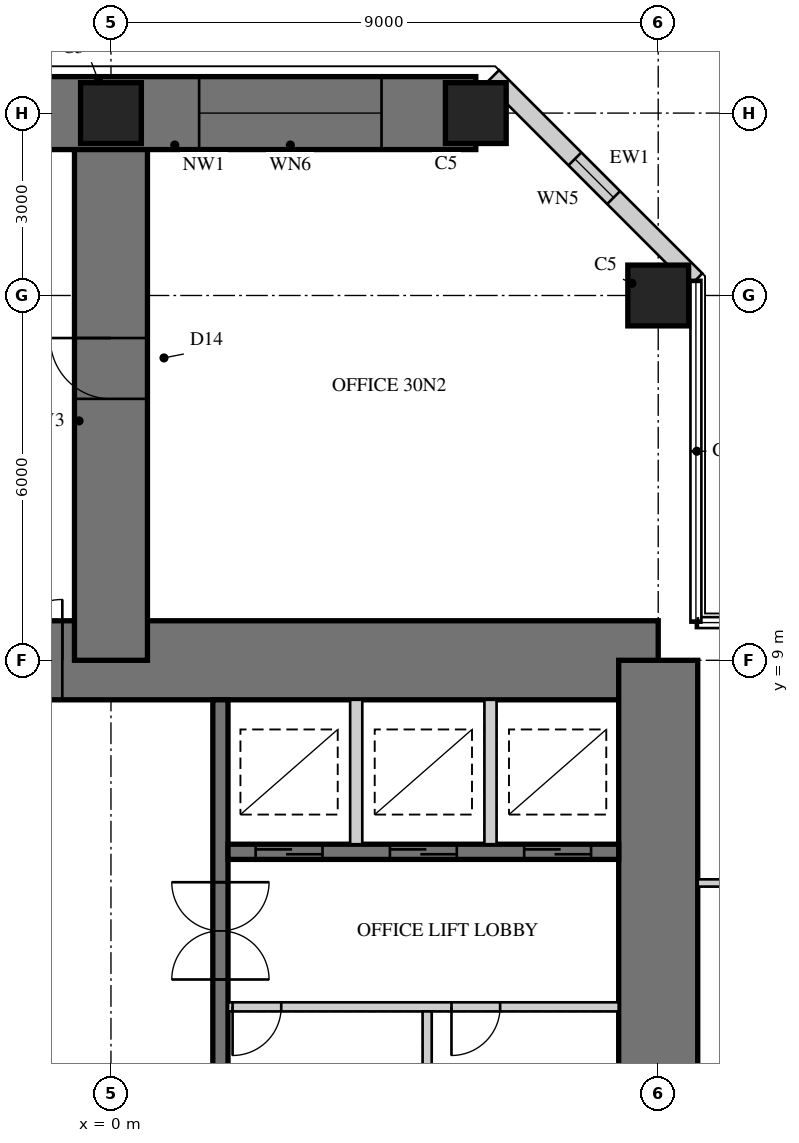
"""IFC4 building model, lengths in metres.
Left out: names, types, materials, properties, quantities, classifications, styles, units other than length and angle.
Written with IfcOpenShell. Run it as: python <this file> out.ifc"""

import sys

from ifc_helpers import new_model, si_unit, direction, frame, frame_2d, origin, origin_2d, place, context, subcontext, project, spatial, rectangle, hollow_rectangle, extrude, element, fill, save


model = new_model("IFC4")
c1 = context("Model", 3, precision=1e-05, world=origin(), true_north=direction((0.0, 1.0)))
c2 = subcontext(c1, "Body", "Model", "MODEL_VIEW")
j1 = project(units=[si_unit("LENGTHUNIT", "METRE"), si_unit("PLANEANGLEUNIT", "RADIAN")], contexts=[c1])
p1 = place(None, origin())
s1 = spatial("IfcSite", under=j1, at=p1, CompositionType="ELEMENT")
p2 = place(p1, origin())
s2 = spatial("IfcBuilding", under=s1, at=p2, CompositionType="ELEMENT")
p3 = place(p2, frame((0.0, 0.0, 124.5)))
s3 = spatial("IfcBuildingStorey", under=s2, at=p3, CompositionType="ELEMENT", Elevation=124.5)
p4 = place(p3, frame((9.0, 9.0, 0.0), z_axis=(0.0, 0.0, 1.0), x_axis=(-1.0, 0.0, 0.0)))
e1 = element("IfcWall", 1, at=p4, inside=s3, PredefinedType="SHEAR", context=c2, shape_type="SweptSolid", body=[
    extrude(rectangle(XDim=18.0, YDim=1.3, at=frame_2d((9.0, 0.0))), origin(), (0.0, 0.0, 1.0), 4.0),
])
p5 = place(p4, frame((9.8, 0.0, 0.0)))
e2 = element("IfcOpeningElement", 2, at=p5, cuts=e1, PredefinedType="OPENING", context=c2, shape_type="SweptSolid", body=[
    extrude(rectangle(XDim=1.0, YDim=2.4, at=frame_2d((0.5, 1.2))), frame((0.0, 0.66, 0.0), z_axis=(0.0, -1.0, 0.0), x_axis=(1.0, 0.0, 0.0)), (0.0, 0.0, 1.0), 1.32),
])
p6 = place(p3, frame((9.0, -9.0, 0.0), z_axis=(0.0, 0.0, 1.0), x_axis=(0.0, 1.0, 0.0)))
e3 = element("IfcWall", 3, at=p6, inside=s3, PredefinedType="SHEAR", context=c2, shape_type="SweptSolid", body=[
    extrude(rectangle(XDim=18.0, YDim=1.3, at=frame_2d((9.0, 0.0))), origin(), (0.0, 0.0, 1.0), 4.0),
])
p7 = place(p6, frame((9.8, 0.0, 0.0)))
e4 = element("IfcOpeningElement", 4, at=p7, cuts=e3, PredefinedType="OPENING", context=c2, shape_type="SweptSolid", body=[
    extrude(rectangle(XDim=1.0, YDim=2.4, at=frame_2d((0.5, 1.2))), frame((0.0, 0.66, 0.0), z_axis=(0.0, -1.0, 0.0), x_axis=(1.0, 0.0, 0.0)), (0.0, 0.0, 1.0), 1.32),
])
p8 = place(p3, frame((1.8, 1.875, 0.0), z_axis=(0.0, 0.0, 1.0), x_axis=(0.0, 1.0, 0.0)))
e5 = element("IfcWall", 5, at=p8, inside=s3, PredefinedType="SHEAR", context=c2, shape_type="SweptSolid", body=[
    extrude(rectangle(XDim=6.475, YDim=0.25, at=frame_2d((3.238, 0.0))), origin(), (0.0, 0.0, 1.0), 4.0),
])
p9 = place(p8, frame((1.875, 0.0, 0.0)))
e6 = element("IfcOpeningElement", 6, at=p9, cuts=e5, PredefinedType="OPENING", context=c2, shape_type="SweptSolid", body=[
    extrude(rectangle(XDim=1.6, YDim=2.4, at=frame_2d((0.8, 1.2))), frame((0.0, 0.135, 0.0), z_axis=(0.0, -1.0, 0.0), x_axis=(1.0, 0.0, 0.0)), (0.0, 0.0, 1.0), 0.27),
])
p10 = place(p3, frame((1.925, 5.85, 0.0), z_axis=(0.0, 0.0, 1.0), x_axis=(1.0, 0.0, 0.0)))
e7 = element("IfcWall", 7, at=p10, inside=s3, PredefinedType="SHEAR", context=c2, shape_type="SweptSolid", body=[
    extrude(rectangle(XDim=6.425, YDim=0.25, at=frame_2d((3.212, 0.0))), origin(), (0.0, 0.0, 1.0), 4.0),
])
p11 = place(p10, frame((0.454, 0.0, 0.0)))
e8 = element("IfcOpeningElement", 8, at=p11, cuts=e7, PredefinedType="OPENING", context=c2, shape_type="SweptSolid", body=[
    extrude(rectangle(XDim=1.1, YDim=2.2, at=frame_2d((0.55, 1.1))), frame((0.0, 0.135, 0.0), z_axis=(0.0, -1.0, 0.0), x_axis=(1.0, 0.0, 0.0)), (0.0, 0.0, 1.0), 0.27),
])
p12 = place(p10, frame((2.663, 0.0, 0.0)))
e9 = element("IfcOpeningElement", 9, at=p12, cuts=e7, PredefinedType="OPENING", context=c2, shape_type="SweptSolid", body=[
    extrude(rectangle(XDim=1.1, YDim=2.2, at=frame_2d((0.55, 1.1))), frame((0.0, 0.135, 0.0), z_axis=(0.0, -1.0, 0.0), x_axis=(1.0, 0.0, 0.0)), (0.0, 0.0, 1.0), 0.27),
])
p13 = place(p10, frame((4.871, 0.0, 0.0)))
e10 = element("IfcOpeningElement", 10, at=p13, cuts=e7, PredefinedType="OPENING", context=c2, shape_type="SweptSolid", body=[
    extrude(rectangle(XDim=1.1, YDim=2.2, at=frame_2d((0.55, 1.1))), frame((0.0, 0.135, 0.0), z_axis=(0.0, -1.0, 0.0), x_axis=(1.0, 0.0, 0.0)), (0.0, 0.0, 1.0), 0.27),
])
p14 = place(p3, frame((1.925, 3.3, 0.0), z_axis=(0.0, 0.0, 1.0), x_axis=(1.0, 0.0, 0.0)))
e11 = element("IfcWall", 11, at=p14, inside=s3, PredefinedType="PARTITIONING", context=c2, shape_type="SweptSolid", body=[
    extrude(rectangle(XDim=6.425, YDim=0.15, at=frame_2d((3.212, 0.0))), origin(), (0.0, 0.0, 1.0), 4.0),
])
p15 = place(p14, frame((0.075, 0.0, 0.0)))
e12 = element("IfcOpeningElement", 12, at=p15, cuts=e11, PredefinedType="OPENING", context=c2, shape_type="SweptSolid", body=[
    extrude(rectangle(XDim=0.8, YDim=2.1, at=frame_2d((0.4, 1.05))), frame((0.0, 0.085, 0.0), z_axis=(0.0, -1.0, 0.0), x_axis=(1.0, 0.0, 0.0)), (0.0, 0.0, 1.0), 0.17),
])
p16 = place(p14, frame((3.675, 0.0, 0.0)))
e13 = element("IfcOpeningElement", 13, at=p16, cuts=e11, PredefinedType="OPENING", context=c2, shape_type="SweptSolid", body=[
    extrude(rectangle(XDim=0.8, YDim=2.1, at=frame_2d((0.4, 1.05))), frame((0.0, 0.085, 0.0), z_axis=(0.0, -1.0, 0.0), x_axis=(1.0, 0.0, 0.0)), (0.0, 0.0, 1.0), 0.17),
])
p17 = place(p3, frame((5.2, 2.125, 0.0), z_axis=(0.0, 0.0, 1.0), x_axis=(0.0, 1.0, 0.0)))
e14 = element("IfcWall", 14, at=p17, inside=s3, PredefinedType="PARTITIONING", context=c2, shape_type="SweptSolid", body=[
    extrude(rectangle(XDim=1.1, YDim=0.15, at=frame_2d((0.55, 0.0))), origin(), (0.0, 0.0, 1.0), 4.0),
])
for number, where, z_axis, x_axis in (
    (15, (4.033, 5.975, 0.0), (0.0, 0.0, 1.0), (0.0, 1.0, 0.0)),
    (16, (6.242, 5.975, 0.0), (0.0, 0.0, 1.0), (0.0, 1.0, 0.0)),
):
    element("IfcWall", number, at=place(p3, frame(where, z_axis=z_axis, x_axis=x_axis)), inside=s3, PredefinedType="PARTITIONING", context=c2, shape_type="SweptSolid", body=[
        extrude(rectangle(XDim=2.375, YDim=0.2, at=frame_2d((1.188, 0.0))), origin(), (0.0, 0.0, 1.0), 4.0),
    ])
p18 = place(p3, frame((0.0, 9.0, 0.0), z_axis=(0.0, 0.0, 1.0), x_axis=(0.0, 1.0, 0.0)))
e17 = element("IfcWall", 17, at=p18, inside=s3, PredefinedType="SHEAR", context=c2, shape_type="SweptSolid", body=[
    extrude(rectangle(XDim=9.0, YDim=1.2, at=frame_2d((4.5, 0.0))), origin(), (0.0, 0.0, 1.0), 4.0),
])
p19 = place(p18, frame((4.3, 0.0, 0.0)))
e18 = element("IfcOpeningElement", 18, at=p19, cuts=e17, PredefinedType="OPENING", context=c2, shape_type="SweptSolid", body=[
    extrude(rectangle(XDim=1.0, YDim=2.2, at=frame_2d((0.5, 1.1))), frame((0.0, 0.61, 0.0), z_axis=(0.0, -1.0, 0.0), x_axis=(1.0, 0.0, 0.0)), (0.0, 0.0, 1.0), 1.22),
])
p20 = place(p3, frame((6.0, 18.0, 0.0), z_axis=(0.0, 0.0, 1.0), x_axis=(-1.0, 0.0, 0.0)))
e19 = element("IfcWall", 19, at=p20, inside=s3, PredefinedType="SHEAR", context=c2, shape_type="SweptSolid", body=[
    extrude(rectangle(XDim=12.0, YDim=1.2, at=frame_2d((6.0, 0.0))), origin(), (0.0, 0.0, 1.0), 4.0),
])
p21 = place(p20, frame((1.55, 0.0, 0.6)))
e20 = element("IfcOpeningElement", 20, at=p21, cuts=e19, PredefinedType="OPENING", context=c2, shape_type="SweptSolid", body=[
    extrude(rectangle(XDim=3.0, YDim=2.4, at=frame_2d((1.5, 1.2))), frame((0.0, 0.61, 0.0), z_axis=(0.0, -1.0, 0.0), x_axis=(1.0, 0.0, 0.0)), (0.0, 0.0, 1.0), 1.22),
])
p22 = place(p20, frame((7.45, 0.0, 0.6)))
e21 = element("IfcOpeningElement", 21, at=p22, cuts=e19, PredefinedType="OPENING", context=c2, shape_type="SweptSolid", body=[
    extrude(rectangle(XDim=3.0, YDim=2.4, at=frame_2d((1.5, 1.2))), frame((0.0, 0.61, 0.0), z_axis=(0.0, -1.0, 0.0), x_axis=(1.0, 0.0, 0.0)), (0.0, 0.0, 1.0), 1.22),
])
for number, where, z_axis, x_axis in (
    (22, (9.0, 15.0, 0.0), (0.0, 0.0, 1.0), (1.0, 0.0, 0.0)),
    (23, (6.0, 18.0, 0.0), (0.0, 0.0, 1.0), (1.0, 0.0, 0.0)),
    (24, (0.0, 18.0, 0.0), (0.0, 0.0, 1.0), (1.0, 0.0, 0.0)),
):
    element("IfcColumn", number, at=place(p3, frame(where, z_axis=z_axis, x_axis=x_axis)), inside=s3, PredefinedType="COLUMN", context=c2, shape_type="SweptSolid", body=[
        extrude(rectangle(XDim=1.0, YDim=1.0, at=origin_2d()), origin(), (0.0, 0.0, 1.0), 4.0),
    ])
p23 = place(p3, frame((9.62, 15.257, 0.0), z_axis=(0.0, 0.0, 1.0), x_axis=(-0.707106781187, 0.707106781187, 0.0)))
e25 = element("IfcWall", 25, at=p23, inside=s3, PredefinedType="SOLIDWALL", context=c2, shape_type="SweptSolid", body=[
    extrude(rectangle(XDim=4.728, YDim=0.3, at=frame_2d((2.364, 0.0))), origin(), (0.0, 0.0, 1.0), 3.8),
])
p24 = place(p23, frame((1.914, 0.0, 0.3)))
e26 = element("IfcOpeningElement", 26, at=p24, cuts=e25, PredefinedType="OPENING", context=c2, shape_type="SweptSolid", body=[
    extrude(rectangle(XDim=0.9, YDim=2.4, at=frame_2d((0.45, 1.2))), frame((0.0, 0.16, 0.0), z_axis=(0.0, -1.0, 0.0), x_axis=(1.0, 0.0, 0.0)), (0.0, 0.0, 1.0), 0.32),
])
p25 = place(p3, frame((9.65, 5.337, 0.0), z_axis=(0.0, 0.0, 1.0), x_axis=(1.0, 0.0, 0.0)))
e27 = element("IfcWall", 27, at=p25, inside=s3, PredefinedType="PLUMBINGWALL", context=c2, shape_type="SweptSolid", body=[
    extrude(rectangle(XDim=5.25, YDim=0.12, at=frame_2d((2.625, 0.0))), origin(), (0.0, 0.0, 1.0), 3.8),
])
p26 = place(p24, origin())
e28 = element("IfcWindow", 28, at=p26, inside=s3, PartitioningType="SINGLE_PANEL", PredefinedType="WINDOW", context=c2, shape_type="SweptSolid", body=[
    extrude(hollow_rectangle(XDim=0.9, YDim=2.4, WallThickness=0.06, at=frame_2d((0.45, 1.2))), frame((0.0, 0.03, 0.0), z_axis=(0.0, -1.0, 0.0), x_axis=(1.0, 0.0, 0.0)), (0.0, 0.0, 1.0), 0.06),
    extrude(rectangle(XDim=0.779, YDim=2.279, at=frame_2d((0.45, 1.2))), frame((0.0, 0.03, 0.0), z_axis=(0.0, -1.0, 0.0), x_axis=(1.0, 0.0, 0.0)), (0.0, 0.0, 1.0), 0.06),
])
fill(e26, e28)
p27 = place(p21, origin())
e29 = element("IfcWindow", 29, at=p27, inside=s3, PartitioningType="SINGLE_PANEL", PredefinedType="WINDOW", context=c2, shape_type="SweptSolid", body=[
    extrude(hollow_rectangle(XDim=3.0, YDim=2.4, WallThickness=0.06, at=frame_2d((1.5, 1.2))), frame((0.0, 0.03, 0.0), z_axis=(0.0, -1.0, 0.0), x_axis=(1.0, 0.0, 0.0)), (0.0, 0.0, 1.0), 0.06),
    extrude(rectangle(XDim=2.879, YDim=2.279, at=frame_2d((1.5, 1.2))), frame((0.0, 0.03, 0.0), z_axis=(0.0, -1.0, 0.0), x_axis=(1.0, 0.0, 0.0)), (0.0, 0.0, 1.0), 0.06),
])
fill(e20, e29)
p28 = place(p19, origin())
e30 = element("IfcDoor", 30, at=p28, inside=s3, OperationType="SINGLE_SWING_RIGHT", PredefinedType="DOOR", context=c2, shape_type="SweptSolid", body=[
    extrude(rectangle(XDim=1.0, YDim=2.2, at=frame_2d((0.5, 1.1))), frame((0.0, 0.025, 0.0), z_axis=(0.0, -1.0, 0.0), x_axis=(1.0, 0.0, 0.0)), (0.0, 0.0, 1.0), 0.05),
])
fill(e18, e30)
p29 = place(p5, frame((1.0, 0.0, 0.0), z_axis=(0.0, 0.0, 1.0), x_axis=(-1.0, 0.0, 0.0)))
e31 = element("IfcDoor", 31, at=p29, inside=s3, OperationType="SINGLE_SWING_RIGHT", PredefinedType="DOOR", context=c2, shape_type="SweptSolid", body=[
    extrude(rectangle(XDim=1.0, YDim=2.4, at=frame_2d((0.5, 1.2))), frame((0.0, -0.005, 0.0), z_axis=(0.0, -1.0, 0.0), x_axis=(1.0, 0.0, 0.0)), (0.0, 0.0, 1.0), 0.05),
])
fill(e2, e31)
p30 = place(p11, origin())
e32 = element("IfcDoor", 32, at=p30, inside=s3, OperationType="DOUBLE_DOOR_SLIDING", PredefinedType="DOOR", context=c2, shape_type="SweptSolid", body=[
    extrude(rectangle(XDim=1.1, YDim=2.2, at=frame_2d((0.55, 1.1))), frame((0.0, 0.025, 0.0), z_axis=(0.0, -1.0, 0.0), x_axis=(1.0, 0.0, 0.0)), (0.0, 0.0, 1.0), 0.05),
])
fill(e8, e32)
p31 = place(p12, origin())
e33 = element("IfcDoor", 33, at=p31, inside=s3, OperationType="DOUBLE_DOOR_SLIDING", PredefinedType="DOOR", context=c2, shape_type="SweptSolid", body=[
    extrude(rectangle(XDim=1.1, YDim=2.2, at=frame_2d((0.55, 1.1))), frame((0.0, 0.025, 0.0), z_axis=(0.0, -1.0, 0.0), x_axis=(1.0, 0.0, 0.0)), (0.0, 0.0, 1.0), 0.05),
])
fill(e9, e33)
p32 = place(p13, origin())
e34 = element("IfcDoor", 34, at=p32, inside=s3, OperationType="DOUBLE_DOOR_SLIDING", PredefinedType="DOOR", context=c2, shape_type="SweptSolid", body=[
    extrude(rectangle(XDim=1.1, YDim=2.2, at=frame_2d((0.55, 1.1))), frame((0.0, 0.025, 0.0), z_axis=(0.0, -1.0, 0.0), x_axis=(1.0, 0.0, 0.0)), (0.0, 0.0, 1.0), 0.05),
])
fill(e10, e34)
p33 = place(p9, origin())
e35 = element("IfcDoor", 35, at=p33, inside=s3, OperationType="DOUBLE_DOOR_DOUBLE_SWING", PredefinedType="DOOR", context=c2, shape_type="SweptSolid", body=[
    extrude(rectangle(XDim=1.6, YDim=2.4, at=frame_2d((0.8, 1.2))), frame((0.0, 0.025, 0.0), z_axis=(0.0, -1.0, 0.0), x_axis=(1.0, 0.0, 0.0)), (0.0, 0.0, 1.0), 0.05),
])
fill(e6, e35)
p34 = place(p15, frame((0.8, 0.0, 0.0), z_axis=(0.0, 0.0, 1.0), x_axis=(-1.0, 0.0, 0.0)))
e36 = element("IfcDoor", 36, at=p34, inside=s3, OperationType="SINGLE_SWING_RIGHT", PredefinedType="DOOR", context=c2, shape_type="SweptSolid", body=[
    extrude(rectangle(XDim=0.8, YDim=2.1, at=frame_2d((0.4, 1.05))), frame((0.0, 0.025, 0.0), z_axis=(0.0, -1.0, 0.0), x_axis=(1.0, 0.0, 0.0)), (0.0, 0.0, 1.0), 0.05),
])
fill(e12, e36)
p35 = place(p16, frame((0.8, 0.0, 0.0), z_axis=(0.0, 0.0, 1.0), x_axis=(-1.0, 0.0, 0.0)))
e37 = element("IfcDoor", 37, at=p35, inside=s3, OperationType="SINGLE_SWING_RIGHT", PredefinedType="DOOR", context=c2, shape_type="SweptSolid", body=[
    extrude(rectangle(XDim=0.8, YDim=2.1, at=frame_2d((0.4, 1.05))), frame((0.0, 0.025, 0.0), z_axis=(0.0, -1.0, 0.0), x_axis=(1.0, 0.0, 0.0)), (0.0, 0.0, 1.0), 0.05),
])
fill(e13, e37)
save(model, sys.argv[1])
